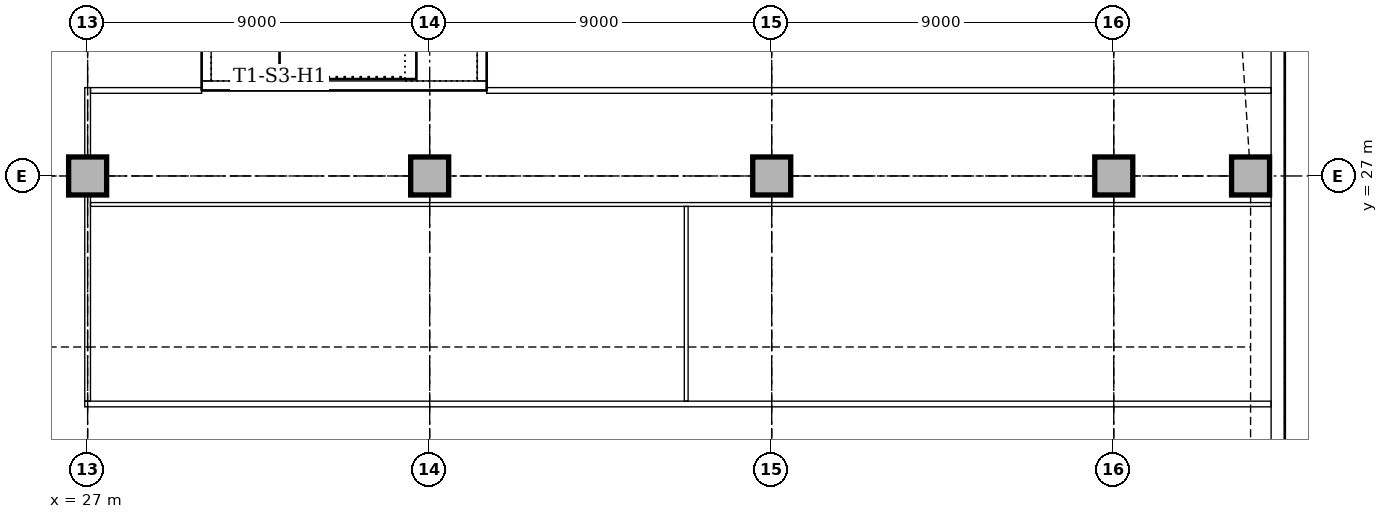
"""IFC4 building model, lengths in metres.
Left out: names, types, materials, properties, quantities, classifications, styles, units other than length and angle.
Written with IfcOpenShell. Run it as: python <this file> out.ifc"""

import sys

from ifc_helpers import new_model, si_unit, direction, frame, frame_2d, origin, origin_2d, place, context, subcontext, project, spatial, rectangle, extrude, element, fill, save


model = new_model("IFC4")
c1 = context("Model", 3, precision=1e-05, world=origin(), true_north=direction((0.0, 1.0)))
c2 = subcontext(c1, "Body", "Model", "MODEL_VIEW")
j1 = project(units=[si_unit("LENGTHUNIT", "METRE"), si_unit("PLANEANGLEUNIT", "RADIAN")], contexts=[c1])
p1 = place(None, origin())
s1 = spatial("IfcSite", under=j1, at=p1, CompositionType="ELEMENT")
p2 = place(p1, origin())
s2 = spatial("IfcBuilding", under=s1, at=p2, CompositionType="ELEMENT")
p3 = place(p2, frame((0.0, 0.0, 26.0)))
s3 = spatial("IfcBuildingStorey", under=s2, at=p3, CompositionType="ELEMENT", Elevation=26.0)
p4 = place(p3, frame((30.0, 29.375, 0.0), z_axis=(0.0, 0.0, 1.0), x_axis=(1.0, 0.0, 0.0)))
e1 = element("IfcWall", 1, at=p4, inside=s3, PredefinedType="SOLIDWALL", context=c2, shape_type="SweptSolid", body=[
    extrude(rectangle(XDim=7.5, YDim=0.25, at=frame_2d((3.75, 0.0))), origin(), (0.0, 0.0, 1.0), 4.0),
])
p5 = place(p3, frame((37.375, 29.5, 0.0), z_axis=(0.0, 0.0, 1.0), x_axis=(0.0, 1.0, 0.0)))
e2 = element("IfcWall", 2, at=p5, inside=s3, PredefinedType="SOLIDWALL", context=c2, shape_type="SweptSolid", body=[
    extrude(rectangle(XDim=4.0, YDim=0.25, at=frame_2d((2.0, 0.0))), origin(), (0.0, 0.0, 1.0), 4.0),
])
p6 = place(p3, frame((30.125, 33.5, 0.0), z_axis=(0.0, 0.0, 1.0), x_axis=(0.0, -1.0, 0.0)))
e3 = element("IfcWall", 3, at=p6, inside=s3, PredefinedType="SOLIDWALL", context=c2, shape_type="SweptSolid", body=[
    extrude(rectangle(XDim=4.0, YDim=0.25, at=frame_2d((2.0, 0.0))), origin(), (0.0, 0.0, 1.0), 4.0),
])
p7 = place(p6, frame((1.5, 0.0, 0.0)))
e4 = element("IfcOpeningElement", 4, at=p7, cuts=e3, PredefinedType="OPENING", context=c2, shape_type="SweptSolid", body=[
    extrude(rectangle(XDim=1.0, YDim=2.1, at=frame_2d((0.5, 1.05))), frame((0.0, 0.135, 0.0), z_axis=(0.0, -1.0, 0.0), x_axis=(1.0, 0.0, 0.0)), (0.0, 0.0, 1.0), 0.27),
])
for number, where, z_axis, x_axis in (
    (5, (57.6, 27.0, 0.0), (0.0, 0.0, 1.0), (1.0, 0.0, 0.0)),
    (6, (27.0, 27.0, 0.0), (0.0, 0.0, 1.0), (1.0, 0.0, 0.0)),
    (7, (36.0, 27.0, 0.0), (0.0, 0.0, 1.0), (1.0, 0.0, 0.0)),
    (8, (45.0, 27.0, 0.0), (0.0, 0.0, 1.0), (1.0, 0.0, 0.0)),
    (9, (54.0, 27.0, 0.0), (0.0, 0.0, 1.0), (1.0, 0.0, 0.0)),
):
    element("IfcColumn", number, at=place(p3, frame(where, z_axis=z_axis, x_axis=x_axis)), inside=s3, PredefinedType="COLUMN", context=c2, shape_type="SweptSolid", body=[
        extrude(rectangle(XDim=1.0, YDim=1.0, at=origin_2d()), origin(), (0.0, 0.0, 1.0), 3.85),
    ])
p8 = place(p3, frame((58.32, 10.243, 0.0), z_axis=(0.0, 0.0, 1.0), x_axis=(0.0, 1.0, 0.0)))
e10 = element("IfcWall", 10, at=p8, inside=s3, PredefinedType="STANDARD", context=c2, shape_type="SweptSolid", body=[
    extrude(rectangle(XDim=24.515, YDim=0.36, at=frame_2d((12.257, 0.0))), origin(), (0.0, 0.0, 1.0), 3.85),
])
p9 = place(p8, frame((4.607, 0.0, 0.0)))
e11 = element("IfcOpeningElement", 11, at=p9, cuts=e10, PredefinedType="OPENING", context=c2, shape_type="SweptSolid", body=[
    extrude(rectangle(XDim=1.8, YDim=2.4, at=frame_2d((0.9, 1.2))), frame((0.0, 0.19, 0.0), z_axis=(0.0, -1.0, 0.0), x_axis=(1.0, 0.0, 0.0)), (0.0, 0.0, 1.0), 0.38),
])
p10 = place(p8, frame((8.757, 0.0, 0.9)))
e12 = element("IfcOpeningElement", 12, at=p10, cuts=e10, PredefinedType="OPENING", context=c2, shape_type="SweptSolid", body=[
    extrude(rectangle(XDim=1.8, YDim=1.6, at=frame_2d((0.9, 0.8))), frame((0.0, 0.19, 0.0), z_axis=(0.0, -1.0, 0.0), x_axis=(1.0, 0.0, 0.0)), (0.0, 0.0, 1.0), 0.38),
])
p11 = place(p8, frame((12.557, 0.0, 0.9)))
e13 = element("IfcOpeningElement", 13, at=p11, cuts=e10, PredefinedType="OPENING", context=c2, shape_type="SweptSolid", body=[
    extrude(rectangle(XDim=3.3, YDim=1.6, at=frame_2d((1.65, 0.8))), frame((0.0, 0.19, 0.0), z_axis=(0.0, -1.0, 0.0), x_axis=(1.0, 0.0, 0.0)), (0.0, 0.0, 1.0), 0.38),
])
p12 = place(p8, frame((17.357, 0.0, 0.9)))
e14 = element("IfcOpeningElement", 14, at=p12, cuts=e10, PredefinedType="OPENING", context=c2, shape_type="SweptSolid", body=[
    extrude(rectangle(XDim=3.3, YDim=1.6, at=frame_2d((1.65, 0.8))), frame((0.0, 0.19, 0.0), z_axis=(0.0, -1.0, 0.0), x_axis=(1.0, 0.0, 0.0)), (0.0, 0.0, 1.0), 0.38),
])
p13 = place(p3, frame((26.925, 21.0, 0.0), z_axis=(0.0, 0.0, 1.0), x_axis=(1.0, 0.0, 0.0)))
e15 = element("IfcWall", 15, at=p13, inside=s3, PredefinedType="PARTITIONING", context=c2, shape_type="SweptSolid", body=[
    extrude(rectangle(XDim=31.215, YDim=0.15, at=frame_2d((15.607, 0.0))), origin(), (0.0, 0.0, 1.0), 3.85),
])
p14 = place(p3, frame((27.0, 21.075, 0.0), z_axis=(0.0, 0.0, 1.0), x_axis=(0.0, 1.0, 0.0)))
e16 = element("IfcWall", 16, at=p14, inside=s3, PredefinedType="PARTITIONING", context=c2, shape_type="SweptSolid", body=[
    extrude(rectangle(XDim=5.425, YDim=0.15, at=frame_2d((2.712, 0.0))), origin(), (0.0, 0.0, 1.0), 3.158),
])
p15 = place(p3, frame((27.0, 27.5, 0.0), z_axis=(0.0, 0.0, 1.0), x_axis=(0.0, 1.0, 0.0)))
e17 = element("IfcWall", 17, at=p15, inside=s3, PredefinedType="PARTITIONING", context=c2, shape_type="SweptSolid", body=[
    extrude(rectangle(XDim=1.825, YDim=0.15, at=frame_2d((0.912, 0.0))), origin(), (0.0, 0.0, 1.0), 3.158),
])
p16 = place(p15, frame((0.4, 0.0, 0.0)))
e18 = element("IfcOpeningElement", 18, at=p16, cuts=e17, PredefinedType="OPENING", context=c2, shape_type="SweptSolid", body=[
    extrude(rectangle(XDim=1.0, YDim=2.1, at=frame_2d((0.5, 1.05))), frame((0.0, 0.085, 0.0), z_axis=(0.0, -1.0, 0.0), x_axis=(1.0, 0.0, 0.0)), (0.0, 0.0, 1.0), 0.17),
])
p17 = place(p3, frame((27.075, 29.25, 0.0), z_axis=(0.0, 0.0, 1.0), x_axis=(1.0, 0.0, 0.0)))
e19 = element("IfcWall", 19, at=p17, inside=s3, PredefinedType="PARTITIONING", context=c2, shape_type="SweptSolid", body=[
    extrude(rectangle(XDim=2.925, YDim=0.15, at=frame_2d((1.462, 0.0))), origin(), (0.0, 0.0, 1.0), 3.85),
])
p18 = place(p3, frame((37.5, 29.25, 0.0), z_axis=(0.0, 0.0, 1.0), x_axis=(1.0, 0.0, 0.0)))
e20 = element("IfcWall", 20, at=p18, inside=s3, PredefinedType="PARTITIONING", context=c2, shape_type="SweptSolid", body=[
    extrude(rectangle(XDim=20.64, YDim=0.15, at=frame_2d((10.32, 0.0))), origin(), (0.0, 0.0, 1.0), 3.85),
])
p19 = place(p3, frame((27.075, 26.25, 0.0), z_axis=(0.0, 0.0, 1.0), x_axis=(1.0, 0.0, 0.0)))
e21 = element("IfcWall", 21, at=p19, inside=s3, PredefinedType="PARTITIONING", context=c2, shape_type="SweptSolid", body=[
    extrude(rectangle(XDim=31.065, YDim=0.1, at=frame_2d((15.533, 0.0))), origin(), (0.0, 0.0, 1.0), 3.85),
])
p20 = place(p19, frame((7.45, 0.0, 0.0)))
e22 = element("IfcOpeningElement", 22, at=p20, cuts=e21, PredefinedType="OPENING", context=c2, shape_type="SweptSolid", body=[
    extrude(rectangle(XDim=0.9, YDim=2.1, at=frame_2d((0.45, 1.05))), frame((0.0, 0.06, 0.0), z_axis=(0.0, -1.0, 0.0), x_axis=(1.0, 0.0, 0.0)), (0.0, 0.0, 1.0), 0.12),
])
p21 = place(p19, frame((22.825, 0.0, 0.0)))
e23 = element("IfcOpeningElement", 23, at=p21, cuts=e21, PredefinedType="OPENING", context=c2, shape_type="SweptSolid", body=[
    extrude(rectangle(XDim=0.9, YDim=2.1, at=frame_2d((0.45, 1.05))), frame((0.0, 0.06, 0.0), z_axis=(0.0, -1.0, 0.0), x_axis=(1.0, 0.0, 0.0)), (0.0, 0.0, 1.0), 0.12),
])
p22 = place(p3, frame((42.75, 21.075, 0.0), z_axis=(0.0, 0.0, 1.0), x_axis=(0.0, 1.0, 0.0)))
e24 = element("IfcWall", 24, at=p22, inside=s3, PredefinedType="PARTITIONING", context=c2, shape_type="SweptSolid", body=[
    extrude(rectangle(XDim=5.125, YDim=0.1, at=frame_2d((2.562, 0.0))), origin(), (0.0, 0.0, 1.0), 3.85),
])
p23 = place(p10, origin())
e25 = element("IfcWindow", 25, at=p23, inside=s3, PartitioningType="SINGLE_PANEL", PredefinedType="WINDOW", context=c2, shape_type="SweptSolid", body=[
    extrude(rectangle(XDim=1.8, YDim=1.6, at=frame_2d((0.9, 0.8))), frame((0.0, 0.13, 0.0), z_axis=(0.0, -1.0, 0.0), x_axis=(1.0, 0.0, 0.0)), (0.0, 0.0, 1.0), 0.06),
])
fill(e12, e25)
p24 = place(p11, origin())
e26 = element("IfcWindow", 26, at=p24, inside=s3, PartitioningType="SINGLE_PANEL", PredefinedType="WINDOW", context=c2, shape_type="SweptSolid", body=[
    extrude(rectangle(XDim=3.3, YDim=1.6, at=frame_2d((1.65, 0.8))), frame((0.0, 0.13, 0.0), z_axis=(0.0, -1.0, 0.0), x_axis=(1.0, 0.0, 0.0)), (0.0, 0.0, 1.0), 0.06),
])
fill(e13, e26)
p25 = place(p12, origin())
e27 = element("IfcWindow", 27, at=p25, inside=s3, PartitioningType="SINGLE_PANEL", PredefinedType="WINDOW", context=c2, shape_type="SweptSolid", body=[
    extrude(rectangle(XDim=3.3, YDim=1.6, at=frame_2d((1.65, 0.8))), frame((0.0, 0.13, 0.0), z_axis=(0.0, -1.0, 0.0), x_axis=(1.0, 0.0, 0.0)), (0.0, 0.0, 1.0), 0.06),
])
fill(e14, e27)
p26 = place(p16, frame((1.0, 0.0, 0.0), z_axis=(0.0, 0.0, 1.0), x_axis=(-1.0, 0.0, 0.0)))
e28 = element("IfcDoor", 28, at=p26, inside=s3, OperationType="SINGLE_SWING_LEFT", PredefinedType="DOOR", context=c2, shape_type="SweptSolid", body=[
    extrude(rectangle(XDim=1.0, YDim=2.1, at=frame_2d((0.5, 1.05))), frame((0.0, 0.025, 0.0), z_axis=(0.0, -1.0, 0.0), x_axis=(1.0, 0.0, 0.0)), (0.0, 0.0, 1.0), 0.05),
])
fill(e18, e28)
p27 = place(p20, frame((0.9, 0.0, 0.0), z_axis=(0.0, 0.0, 1.0), x_axis=(-1.0, 0.0, 0.0)))
e29 = element("IfcDoor", 29, at=p27, inside=s3, OperationType="SINGLE_SWING_LEFT", PredefinedType="DOOR", context=c2, shape_type="SweptSolid", body=[
    extrude(rectangle(XDim=0.9, YDim=2.1, at=frame_2d((0.45, 1.05))), frame((0.0, 0.025, 0.0), z_axis=(0.0, -1.0, 0.0), x_axis=(1.0, 0.0, 0.0)), (0.0, 0.0, 1.0), 0.05),
])
fill(e22, e29)
p28 = place(p21, frame((0.9, 0.0, 0.0), z_axis=(0.0, 0.0, 1.0), x_axis=(-1.0, 0.0, 0.0)))
e30 = element("IfcDoor", 30, at=p28, inside=s3, OperationType="SINGLE_SWING_RIGHT", PredefinedType="DOOR", context=c2, shape_type="SweptSolid", body=[
    extrude(rectangle(XDim=0.9, YDim=2.1, at=frame_2d((0.45, 1.05))), frame((0.0, 0.025, 0.0), z_axis=(0.0, -1.0, 0.0), x_axis=(1.0, 0.0, 0.0)), (0.0, 0.0, 1.0), 0.05),
])
fill(e23, e30)
save(model, sys.argv[1])
